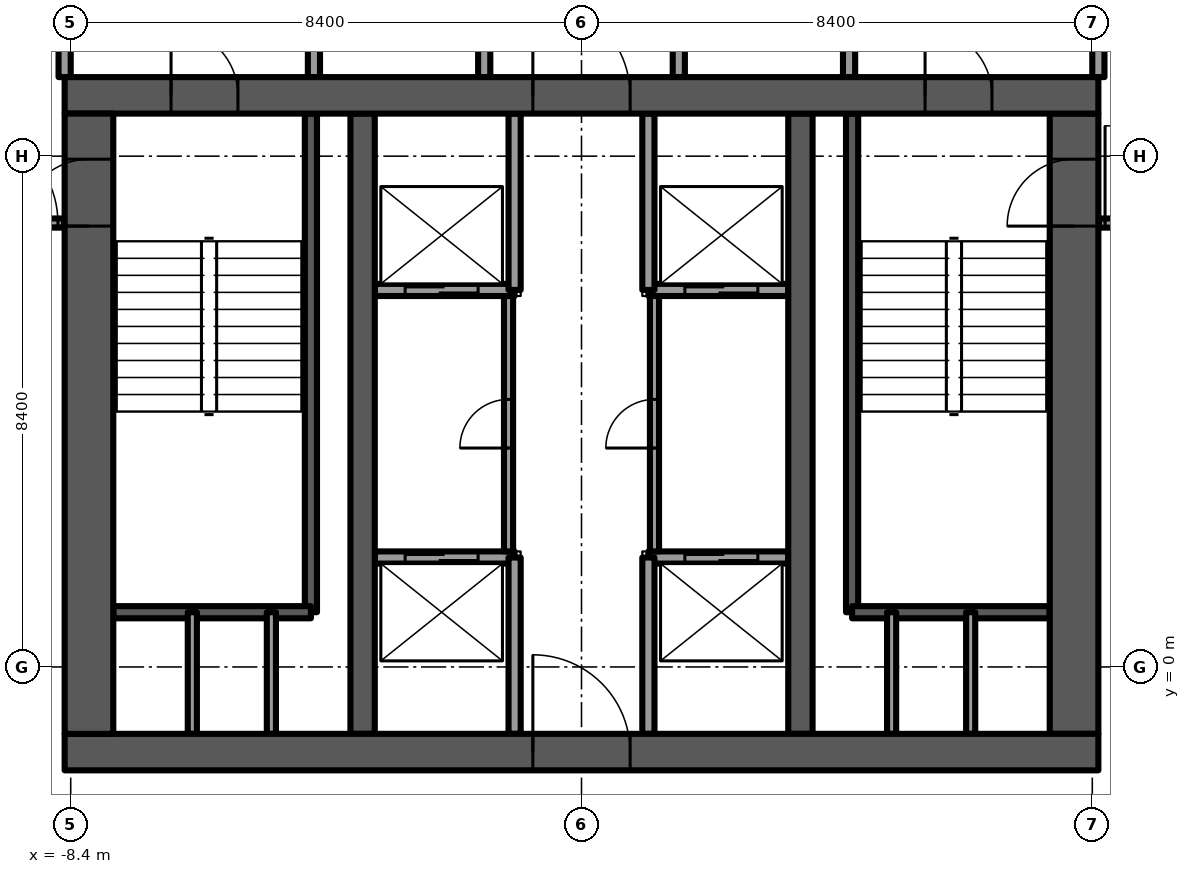
"""IFC4 building model, lengths in metres.
Left out: names, types, materials, properties, quantities, classifications, styles, units other than length and angle.
Written with IfcOpenShell. Run it as: python <this file> out.ifc"""

import sys

from ifc_helpers import new_model, si_unit, direction, frame, frame_2d, origin, place, context, subcontext, project, spatial, rectangle, extrude, element, fill, save


model = new_model("IFC4")
c1 = context("Model", 3, precision=1e-05, world=origin(), true_north=direction((0.0, 1.0)))
c2 = subcontext(c1, "Body", "Model", "MODEL_VIEW")
j1 = project(units=[si_unit("LENGTHUNIT", "METRE"), si_unit("PLANEANGLEUNIT", "RADIAN")], contexts=[c1])
p1 = place(None, origin())
s1 = spatial("IfcSite", under=j1, at=p1, CompositionType="ELEMENT")
p2 = place(p1, origin())
s2 = spatial("IfcBuilding", under=s1, at=p2, CompositionType="ELEMENT")
p3 = place(p2, frame((0.0, 0.0, 222.0)))
s3 = spatial("IfcBuildingStorey", under=s2, at=p3, CompositionType="ELEMENT", Elevation=222.0)
p4 = place(p3, frame((-8.5, -1.4, -0.3), z_axis=(0.0, 0.0, 1.0), x_axis=(1.0, 0.0, 0.0)))
e1 = element("IfcWall", 1, at=p4, inside=s3, PredefinedType="SHEAR", context=c2, shape_type="SweptSolid", body=[
    extrude(rectangle(XDim=17.0, YDim=0.6, at=frame_2d((8.5, 0.0))), origin(), (0.0, 0.0, 1.0), 3.75),
])
p5 = place(p4, frame((7.7, 0.0, 0.0)))
e2 = element("IfcOpeningElement", 2, at=p5, cuts=e1, PredefinedType="OPENING", context=c2, shape_type="SweptSolid", body=[
    extrude(rectangle(XDim=1.6, YDim=2.1, at=frame_2d((0.8, 1.05))), frame((0.0, 0.3, 0.0), z_axis=(0.0, -1.0, 0.0), x_axis=(1.0, 0.0, 0.0)), (0.0, 0.0, 1.0), 0.6),
])
p6 = place(p3, frame((-8.5, 9.4, -0.3), z_axis=(0.0, 0.0, 1.0), x_axis=(1.0, 0.0, 0.0)))
e3 = element("IfcWall", 3, at=p6, inside=s3, PredefinedType="SHEAR", context=c2, shape_type="SweptSolid", body=[
    extrude(rectangle(XDim=17.0, YDim=0.6, at=frame_2d((8.5, 0.0))), origin(), (0.0, 0.0, 1.0), 3.75),
])
p7 = place(p6, frame((7.7, 0.0, 0.0)))
e4 = element("IfcOpeningElement", 4, at=p7, cuts=e3, PredefinedType="OPENING", context=c2, shape_type="SweptSolid", body=[
    extrude(rectangle(XDim=1.6, YDim=2.1, at=frame_2d((0.8, 1.05))), frame((0.0, 0.3, 0.0), z_axis=(0.0, -1.0, 0.0), x_axis=(1.0, 0.0, 0.0)), (0.0, 0.0, 1.0), 0.6),
])
p8 = place(p6, frame((1.75, 0.0, 0.0)))
e5 = element("IfcOpeningElement", 5, at=p8, cuts=e3, PredefinedType="OPENING", context=c2, shape_type="SweptSolid", body=[
    extrude(rectangle(XDim=1.1, YDim=2.1, at=frame_2d((0.55, 1.05))), frame((0.0, 0.3, 0.0), z_axis=(0.0, -1.0, 0.0), x_axis=(1.0, 0.0, 0.0)), (0.0, 0.0, 1.0), 0.6),
])
p9 = place(p6, frame((14.15, 0.0, 0.0)))
e6 = element("IfcOpeningElement", 6, at=p9, cuts=e3, PredefinedType="OPENING", context=c2, shape_type="SweptSolid", body=[
    extrude(rectangle(XDim=1.1, YDim=2.1, at=frame_2d((0.55, 1.05))), frame((0.0, 0.3, 0.0), z_axis=(0.0, -1.0, 0.0), x_axis=(1.0, 0.0, 0.0)), (0.0, 0.0, 1.0), 0.6),
])
p10 = place(p3, frame((-8.1, -1.1, -0.3), z_axis=(0.0, 0.0, 1.0), x_axis=(0.0, 1.0, 0.0)))
e7 = element("IfcWall", 7, at=p10, inside=s3, PredefinedType="SHEAR", context=c2, shape_type="SweptSolid", body=[
    extrude(rectangle(XDim=10.2, YDim=0.8, at=frame_2d((5.1, 0.0))), origin(), (0.0, 0.0, 1.0), 3.75),
])
p11 = place(p10, frame((8.35, 0.0, 0.0)))
e8 = element("IfcOpeningElement", 8, at=p11, cuts=e7, PredefinedType="OPENING", context=c2, shape_type="SweptSolid", body=[
    extrude(rectangle(XDim=1.1, YDim=2.1, at=frame_2d((0.55, 1.05))), frame((0.0, 0.4, 0.0), z_axis=(0.0, -1.0, 0.0), x_axis=(1.0, 0.0, 0.0)), (0.0, 0.0, 1.0), 0.8),
])
p12 = place(p3, frame((8.1, -1.1, -0.3), z_axis=(0.0, 0.0, 1.0), x_axis=(0.0, 1.0, 0.0)))
e9 = element("IfcWall", 9, at=p12, inside=s3, PredefinedType="SHEAR", context=c2, shape_type="SweptSolid", body=[
    extrude(rectangle(XDim=10.2, YDim=0.8, at=frame_2d((5.1, 0.0))), origin(), (0.0, 0.0, 1.0), 3.75),
])
p13 = place(p12, frame((8.35, 0.0, 0.0)))
e10 = element("IfcOpeningElement", 10, at=p13, cuts=e9, PredefinedType="OPENING", context=c2, shape_type="SweptSolid", body=[
    extrude(rectangle(XDim=1.1, YDim=2.1, at=frame_2d((0.55, 1.05))), frame((0.0, 0.4, 0.0), z_axis=(0.0, -1.0, 0.0), x_axis=(1.0, 0.0, 0.0)), (0.0, 0.0, 1.0), 0.8),
])
for number, where, z_axis, x_axis in (
    (11, (-3.6, -1.1, -0.3), (0.0, 0.0, 1.0), (0.0, 1.0, 0.0)),
    (12, (3.6, -1.1, -0.3), (0.0, 0.0, 1.0), (0.0, 1.0, 0.0)),
):
    element("IfcWall", number, at=place(p3, frame(where, z_axis=z_axis, x_axis=x_axis)), inside=s3, PredefinedType="SHEAR", context=c2, shape_type="SweptSolid", body=[
        extrude(rectangle(XDim=10.2, YDim=0.4, at=frame_2d((5.1, 0.0))), origin(), (0.0, 0.0, 1.0), 3.75),
    ])
p14 = place(p3, frame((-3.4, 1.8, 0.0), z_axis=(0.0, 0.0, 1.0), x_axis=(1.0, 0.0, 0.0)))
e13 = element("IfcWall", 13, at=p14, inside=s3, PredefinedType="PARTITIONING", context=c2, shape_type="SweptSolid", body=[
    extrude(rectangle(XDim=2.3, YDim=0.2, at=frame_2d((1.15, 0.0))), origin(), (0.0, 0.0, 1.0), 3.45),
])
p15 = place(p14, frame((0.5, 0.0, 0.0)))
e14 = element("IfcOpeningElement", 14, at=p15, cuts=e13, PredefinedType="OPENING", context=c2, shape_type="SweptSolid", body=[
    extrude(rectangle(XDim=1.2, YDim=2.1, at=frame_2d((0.6, 1.05))), frame((0.0, 0.1, 0.0), z_axis=(0.0, -1.0, 0.0), x_axis=(1.0, 0.0, 0.0)), (0.0, 0.0, 1.0), 0.2),
])
p16 = place(p3, frame((-3.4, 6.2, 0.0), z_axis=(0.0, 0.0, 1.0), x_axis=(1.0, 0.0, 0.0)))
e15 = element("IfcWall", 15, at=p16, inside=s3, PredefinedType="PARTITIONING", context=c2, shape_type="SweptSolid", body=[
    extrude(rectangle(XDim=2.3, YDim=0.2, at=frame_2d((1.15, 0.0))), origin(), (0.0, 0.0, 1.0), 3.45),
])
p17 = place(p16, frame((0.5, 0.0, 0.0)))
e16 = element("IfcOpeningElement", 16, at=p17, cuts=e15, PredefinedType="OPENING", context=c2, shape_type="SweptSolid", body=[
    extrude(rectangle(XDim=1.2, YDim=2.1, at=frame_2d((0.6, 1.05))), frame((0.0, 0.1, 0.0), z_axis=(0.0, -1.0, 0.0), x_axis=(1.0, 0.0, 0.0)), (0.0, 0.0, 1.0), 0.2),
])
p18 = place(p3, frame((1.1, 1.8, 0.0), z_axis=(0.0, 0.0, 1.0), x_axis=(1.0, 0.0, 0.0)))
e17 = element("IfcWall", 17, at=p18, inside=s3, PredefinedType="PARTITIONING", context=c2, shape_type="SweptSolid", body=[
    extrude(rectangle(XDim=2.3, YDim=0.2, at=frame_2d((1.15, 0.0))), origin(), (0.0, 0.0, 1.0), 3.45),
])
p19 = place(p18, frame((0.6, 0.0, 0.0)))
e18 = element("IfcOpeningElement", 18, at=p19, cuts=e17, PredefinedType="OPENING", context=c2, shape_type="SweptSolid", body=[
    extrude(rectangle(XDim=1.2, YDim=2.1, at=frame_2d((0.6, 1.05))), frame((0.0, 0.1, 0.0), z_axis=(0.0, -1.0, 0.0), x_axis=(1.0, 0.0, 0.0)), (0.0, 0.0, 1.0), 0.2),
])
p20 = place(p3, frame((1.1, 6.2, 0.0), z_axis=(0.0, 0.0, 1.0), x_axis=(1.0, 0.0, 0.0)))
e19 = element("IfcWall", 19, at=p20, inside=s3, PredefinedType="PARTITIONING", context=c2, shape_type="SweptSolid", body=[
    extrude(rectangle(XDim=2.3, YDim=0.2, at=frame_2d((1.15, 0.0))), origin(), (0.0, 0.0, 1.0), 3.45),
])
p21 = place(p20, frame((0.6, 0.0, 0.0)))
e20 = element("IfcOpeningElement", 20, at=p21, cuts=e19, PredefinedType="OPENING", context=c2, shape_type="SweptSolid", body=[
    extrude(rectangle(XDim=1.2, YDim=2.1, at=frame_2d((0.6, 1.05))), frame((0.0, 0.1, 0.0), z_axis=(0.0, -1.0, 0.0), x_axis=(1.0, 0.0, 0.0)), (0.0, 0.0, 1.0), 0.2),
])
for number, where, z_axis, x_axis in (
    (21, (-1.1, -1.1, 0.0), (0.0, 0.0, 1.0), (0.0, 1.0, 0.0)),
    (22, (1.1, -1.1, 0.0), (0.0, 0.0, 1.0), (0.0, 1.0, 0.0)),
    (23, (-1.1, 6.2, 0.0), (0.0, 0.0, 1.0), (0.0, 1.0, 0.0)),
    (24, (1.1, 6.2, 0.0), (0.0, 0.0, 1.0), (0.0, 1.0, 0.0)),
):
    element("IfcWall", number, at=place(p3, frame(where, z_axis=z_axis, x_axis=x_axis)), inside=s3, PredefinedType="PARTITIONING", context=c2, shape_type="SweptSolid", body=[
        extrude(rectangle(XDim=2.9, YDim=0.2, at=frame_2d((1.45, 0.0))), origin(), (0.0, 0.0, 1.0), 3.45),
    ])
p22 = place(p3, frame((-4.45, 0.9, -0.3), z_axis=(0.0, 0.0, 1.0), x_axis=(0.0, 1.0, 0.0)))
e25 = element("IfcWall", 25, at=p22, inside=s3, PredefinedType="SOLIDWALL", context=c2, shape_type="SweptSolid", body=[
    extrude(rectangle(XDim=8.2, YDim=0.2, at=frame_2d((4.1, 0.0))), origin(), (0.0, 0.0, 1.0), 3.75),
])
p23 = place(p3, frame((-7.7, 0.9, -0.3), z_axis=(0.0, 0.0, 1.0), x_axis=(1.0, 0.0, 0.0)))
e26 = element("IfcWall", 26, at=p23, inside=s3, PredefinedType="SOLIDWALL", context=c2, shape_type="SweptSolid", body=[
    extrude(rectangle(XDim=3.25, YDim=0.2, at=frame_2d((1.625, 0.0))), origin(), (0.0, 0.0, 1.0), 3.75),
])
for number, where, z_axis, x_axis in (
    (27, (-6.4, -1.1, 0.0), (0.0, 0.0, 1.0), (0.0, 1.0, 0.0)),
    (28, (-5.1, -1.1, 0.0), (0.0, 0.0, 1.0), (0.0, 1.0, 0.0)),
):
    element("IfcWall", number, at=place(p3, frame(where, z_axis=z_axis, x_axis=x_axis)), inside=s3, PredefinedType="PARTITIONING", context=c2, shape_type="SweptSolid", body=[
        extrude(rectangle(XDim=2.0, YDim=0.15, at=frame_2d((1.0, 0.0))), origin(), (0.0, 0.0, 1.0), 3.45),
    ])
p24 = place(p3, frame((4.45, 0.9, -0.3), z_axis=(0.0, 0.0, 1.0), x_axis=(0.0, 1.0, 0.0)))
e29 = element("IfcWall", 29, at=p24, inside=s3, PredefinedType="SOLIDWALL", context=c2, shape_type="SweptSolid", body=[
    extrude(rectangle(XDim=8.2, YDim=0.2, at=frame_2d((4.1, 0.0))), origin(), (0.0, 0.0, 1.0), 3.75),
])
p25 = place(p3, frame((4.45, 0.9, -0.3), z_axis=(0.0, 0.0, 1.0), x_axis=(1.0, 0.0, 0.0)))
e30 = element("IfcWall", 30, at=p25, inside=s3, PredefinedType="SOLIDWALL", context=c2, shape_type="SweptSolid", body=[
    extrude(rectangle(XDim=3.25, YDim=0.2, at=frame_2d((1.625, 0.0))), origin(), (0.0, 0.0, 1.0), 3.75),
])
for number, where, z_axis, x_axis in (
    (31, (5.1, -1.1, 0.0), (0.0, 0.0, 1.0), (0.0, 1.0, 0.0)),
    (32, (6.4, -1.1, 0.0), (0.0, 0.0, 1.0), (0.0, 1.0, 0.0)),
):
    element("IfcWall", number, at=place(p3, frame(where, z_axis=z_axis, x_axis=x_axis)), inside=s3, PredefinedType="PARTITIONING", context=c2, shape_type="SweptSolid", body=[
        extrude(rectangle(XDim=2.0, YDim=0.15, at=frame_2d((1.0, 0.0))), origin(), (0.0, 0.0, 1.0), 3.45),
    ])
p26 = place(p3, frame((-8.5, 9.7, 0.0), z_axis=(0.0, 0.0, 1.0), x_axis=(0.0, 1.0, 0.0)))
e33 = element("IfcWall", 33, at=p26, inside=s3, PredefinedType="PARTITIONING", context=c2, shape_type="SweptSolid", body=[
    extrude(rectangle(XDim=3.9, YDim=0.2, at=frame_2d((1.95, 0.0))), origin(), (0.0, 0.0, 1.0), 3.45),
])
p27 = place(p26, frame((1.35, 0.0, 0.0)))
e34 = element("IfcOpeningElement", 34, at=p27, cuts=e33, PredefinedType="OPENING", context=c2, shape_type="SweptSolid", body=[
    extrude(rectangle(XDim=1.2, YDim=2.1, at=frame_2d((0.6, 1.05))), frame((0.0, 0.1, 0.0), z_axis=(0.0, -1.0, 0.0), x_axis=(1.0, 0.0, 0.0)), (0.0, 0.0, 1.0), 0.2),
])
p28 = place(p3, frame((8.5, 9.7, 0.0), z_axis=(0.0, 0.0, 1.0), x_axis=(0.0, 1.0, 0.0)))
e35 = element("IfcWall", 35, at=p28, inside=s3, PredefinedType="PARTITIONING", context=c2, shape_type="SweptSolid", body=[
    extrude(rectangle(XDim=3.9, YDim=0.2, at=frame_2d((1.95, 0.0))), origin(), (0.0, 0.0, 1.0), 3.45),
])
p29 = place(p28, frame((1.35, 0.0, 0.0)))
e36 = element("IfcOpeningElement", 36, at=p29, cuts=e35, PredefinedType="OPENING", context=c2, shape_type="SweptSolid", body=[
    extrude(rectangle(XDim=1.2, YDim=2.1, at=frame_2d((0.6, 1.05))), frame((0.0, 0.1, 0.0), z_axis=(0.0, -1.0, 0.0), x_axis=(1.0, 0.0, 0.0)), (0.0, 0.0, 1.0), 0.2),
])
p30 = place(p3, frame((-4.4, 9.7, 0.0), z_axis=(0.0, 0.0, 1.0), x_axis=(0.0, 1.0, 0.0)))
e37 = element("IfcWall", 37, at=p30, inside=s3, PredefinedType="PARTITIONING", context=c2, shape_type="SweptSolid", body=[
    extrude(rectangle(XDim=3.9, YDim=0.2, at=frame_2d((1.95, 0.0))), origin(), (0.0, 0.0, 1.0), 3.45),
])
p31 = place(p30, frame((1.35, 0.0, 0.0)))
e38 = element("IfcOpeningElement", 38, at=p31, cuts=e37, PredefinedType="OPENING", context=c2, shape_type="SweptSolid", body=[
    extrude(rectangle(XDim=1.2, YDim=2.1, at=frame_2d((0.6, 1.05))), frame((0.0, 0.1, 0.0), z_axis=(0.0, -1.0, 0.0), x_axis=(1.0, 0.0, 0.0)), (0.0, 0.0, 1.0), 0.2),
])
p32 = place(p3, frame((4.4, 9.7, 0.0), z_axis=(0.0, 0.0, 1.0), x_axis=(0.0, 1.0, 0.0)))
e39 = element("IfcWall", 39, at=p32, inside=s3, PredefinedType="PARTITIONING", context=c2, shape_type="SweptSolid", body=[
    extrude(rectangle(XDim=3.9, YDim=0.2, at=frame_2d((1.95, 0.0))), origin(), (0.0, 0.0, 1.0), 3.45),
])
p33 = place(p32, frame((1.35, 0.0, 0.0)))
e40 = element("IfcOpeningElement", 40, at=p33, cuts=e39, PredefinedType="OPENING", context=c2, shape_type="SweptSolid", body=[
    extrude(rectangle(XDim=1.2, YDim=2.1, at=frame_2d((0.6, 1.05))), frame((0.0, 0.1, 0.0), z_axis=(0.0, -1.0, 0.0), x_axis=(1.0, 0.0, 0.0)), (0.0, 0.0, 1.0), 0.2),
])
for number, where, z_axis, x_axis in (
    (41, (-1.6, 9.7, 0.0), (0.0, 0.0, 1.0), (0.0, 1.0, 0.0)),
    (42, (1.6, 9.7, 0.0), (0.0, 0.0, 1.0), (0.0, 1.0, 0.0)),
):
    element("IfcWall", number, at=place(p3, frame(where, z_axis=z_axis, x_axis=x_axis)), inside=s3, PredefinedType="PARTITIONING", context=c2, shape_type="SweptSolid", body=[
        extrude(rectangle(XDim=3.9, YDim=0.2, at=frame_2d((1.95, 0.0))), origin(), (0.0, 0.0, 1.0), 3.45),
    ])
p34 = place(p3, frame((-1.2, 1.9, 0.0), z_axis=(0.0, 0.0, 1.0), x_axis=(0.0, 1.0, 0.0)))
e43 = element("IfcWall", 43, at=p34, inside=s3, PredefinedType="PARTITIONING", context=c2, shape_type="SweptSolid", body=[
    extrude(rectangle(XDim=4.2, YDim=0.15, at=frame_2d((2.1, 0.0))), origin(), (0.0, 0.0, 1.0), 3.45),
])
p35 = place(p34, frame((1.7, 0.0, 0.0)))
e44 = element("IfcOpeningElement", 44, at=p35, cuts=e43, PredefinedType="OPENING", context=c2, shape_type="SweptSolid", body=[
    extrude(rectangle(XDim=0.8, YDim=2.1, at=frame_2d((0.4, 1.05))), frame((0.0, 0.075, 0.0), z_axis=(0.0, -1.0, 0.0), x_axis=(1.0, 0.0, 0.0)), (0.0, 0.0, 1.0), 0.15),
])
p36 = place(p3, frame((1.2, 1.9, 0.0), z_axis=(0.0, 0.0, 1.0), x_axis=(0.0, 1.0, 0.0)))
e45 = element("IfcWall", 45, at=p36, inside=s3, PredefinedType="PARTITIONING", context=c2, shape_type="SweptSolid", body=[
    extrude(rectangle(XDim=4.2, YDim=0.15, at=frame_2d((2.1, 0.0))), origin(), (0.0, 0.0, 1.0), 3.45),
])
p37 = place(p36, frame((1.7, 0.0, 0.0)))
e46 = element("IfcOpeningElement", 46, at=p37, cuts=e45, PredefinedType="OPENING", context=c2, shape_type="SweptSolid", body=[
    extrude(rectangle(XDim=0.8, YDim=2.1, at=frame_2d((0.4, 1.05))), frame((0.0, 0.075, 0.0), z_axis=(0.0, -1.0, 0.0), x_axis=(1.0, 0.0, 0.0)), (0.0, 0.0, 1.0), 0.15),
])
p38 = place(p3, frame((-10.585, 7.3, 0.0), z_axis=(0.0, 0.0, 1.0), x_axis=(1.0, 0.0, 0.0)))
e47 = element("IfcWall", 47, at=p38, inside=s3, PredefinedType="PARTITIONING", context=c2, shape_type="SweptSolid", body=[
    extrude(rectangle(XDim=2.075, YDim=0.15, at=frame_2d((1.038, 0.0))), origin(), (0.0, 0.0, 1.0), 3.45),
])
p39 = place(p38, frame((0.375, 0.0, 0.0)))
e48 = element("IfcOpeningElement", 48, at=p39, cuts=e47, PredefinedType="OPENING", context=c2, shape_type="SweptSolid", body=[
    extrude(rectangle(XDim=1.6, YDim=2.1, at=frame_2d((0.8, 1.05))), frame((0.0, 0.075, 0.0), z_axis=(0.0, -1.0, 0.0), x_axis=(1.0, 0.0, 0.0)), (0.0, 0.0, 1.0), 0.15),
])
p40 = place(p3, frame((8.51, 7.3, 0.0), z_axis=(0.0, 0.0, 1.0), x_axis=(1.0, 0.0, 0.0)))
e49 = element("IfcWall", 49, at=p40, inside=s3, PredefinedType="PARTITIONING", context=c2, shape_type="SweptSolid", body=[
    extrude(rectangle(XDim=2.075, YDim=0.15, at=frame_2d((1.038, 0.0))), origin(), (0.0, 0.0, 1.0), 3.45),
])
p41 = place(p40, frame((0.1, 0.0, 0.0)))
e50 = element("IfcOpeningElement", 50, at=p41, cuts=e49, PredefinedType="OPENING", context=c2, shape_type="SweptSolid", body=[
    extrude(rectangle(XDim=1.6, YDim=2.1, at=frame_2d((0.8, 1.05))), frame((0.0, 0.075, 0.0), z_axis=(0.0, -1.0, 0.0), x_axis=(1.0, 0.0, 0.0)), (0.0, 0.0, 1.0), 0.15),
])
p42 = place(p15, origin())
e51 = element("IfcDoor", 51, at=p42, inside=s3, OperationType="SLIDING_TO_LEFT", PredefinedType="DOOR", context=c2, shape_type="SweptSolid", body=[
    extrude(rectangle(XDim=1.2, YDim=2.1, at=frame_2d((0.6, 1.05))), frame((0.0, 0.025, 0.0), z_axis=(0.0, -1.0, 0.0), x_axis=(1.0, 0.0, 0.0)), (0.0, 0.0, 1.0), 0.05),
])
fill(e14, e51)
p43 = place(p19, origin())
e52 = element("IfcDoor", 52, at=p43, inside=s3, OperationType="SLIDING_TO_LEFT", PredefinedType="DOOR", context=c2, shape_type="SweptSolid", body=[
    extrude(rectangle(XDim=1.2, YDim=2.1, at=frame_2d((0.6, 1.05))), frame((0.0, 0.025, 0.0), z_axis=(0.0, -1.0, 0.0), x_axis=(1.0, 0.0, 0.0)), (0.0, 0.0, 1.0), 0.05),
])
fill(e18, e52)
p44 = place(p17, origin())
e53 = element("IfcDoor", 53, at=p44, inside=s3, OperationType="SLIDING_TO_LEFT", PredefinedType="DOOR", context=c2, shape_type="SweptSolid", body=[
    extrude(rectangle(XDim=1.2, YDim=2.1, at=frame_2d((0.6, 1.05))), frame((0.0, 0.025, 0.0), z_axis=(0.0, -1.0, 0.0), x_axis=(1.0, 0.0, 0.0)), (0.0, 0.0, 1.0), 0.05),
])
fill(e16, e53)
p45 = place(p21, origin())
e54 = element("IfcDoor", 54, at=p45, inside=s3, OperationType="SLIDING_TO_LEFT", PredefinedType="DOOR", context=c2, shape_type="SweptSolid", body=[
    extrude(rectangle(XDim=1.2, YDim=2.1, at=frame_2d((0.6, 1.05))), frame((0.0, 0.025, 0.0), z_axis=(0.0, -1.0, 0.0), x_axis=(1.0, 0.0, 0.0)), (0.0, 0.0, 1.0), 0.05),
])
fill(e20, e54)
p46 = place(p5, origin())
e55 = element("IfcDoor", 55, at=p46, inside=s3, OperationType="DOUBLE_DOOR_SINGLE_SWING", PredefinedType="DOOR", context=c2, shape_type="SweptSolid", body=[
    extrude(rectangle(XDim=1.6, YDim=2.1, at=frame_2d((0.8, 1.05))), frame((0.0, 0.025, 0.0), z_axis=(0.0, -1.0, 0.0), x_axis=(1.0, 0.0, 0.0)), (0.0, 0.0, 1.0), 0.05),
])
fill(e2, e55)
p47 = place(p7, origin())
e56 = element("IfcDoor", 56, at=p47, inside=s3, OperationType="DOUBLE_DOOR_SINGLE_SWING", PredefinedType="DOOR", context=c2, shape_type="SweptSolid", body=[
    extrude(rectangle(XDim=1.6, YDim=2.1, at=frame_2d((0.8, 1.05))), frame((0.0, 0.025, 0.0), z_axis=(0.0, -1.0, 0.0), x_axis=(1.0, 0.0, 0.0)), (0.0, 0.0, 1.0), 0.05),
])
fill(e4, e56)
p48 = place(p8, origin())
e57 = element("IfcDoor", 57, at=p48, inside=s3, OperationType="SINGLE_SWING_LEFT", PredefinedType="DOOR", context=c2, shape_type="SweptSolid", body=[
    extrude(rectangle(XDim=1.1, YDim=2.1, at=frame_2d((0.55, 1.05))), frame((0.0, 0.025, 0.0), z_axis=(0.0, -1.0, 0.0), x_axis=(1.0, 0.0, 0.0)), (0.0, 0.0, 1.0), 0.05),
])
fill(e5, e57)
p49 = place(p11, origin())
e58 = element("IfcDoor", 58, at=p49, inside=s3, OperationType="SINGLE_SWING_RIGHT", PredefinedType="DOOR", context=c2, shape_type="SweptSolid", body=[
    extrude(rectangle(XDim=1.1, YDim=2.1, at=frame_2d((0.55, 1.05))), frame((0.0, 0.025, 0.0), z_axis=(0.0, -1.0, 0.0), x_axis=(1.0, 0.0, 0.0)), (0.0, 0.0, 1.0), 0.05),
])
fill(e8, e58)
p50 = place(p9, origin())
e59 = element("IfcDoor", 59, at=p50, inside=s3, OperationType="SINGLE_SWING_RIGHT", PredefinedType="DOOR", context=c2, shape_type="SweptSolid", body=[
    extrude(rectangle(XDim=1.1, YDim=2.1, at=frame_2d((0.55, 1.05))), frame((0.0, 0.025, 0.0), z_axis=(0.0, -1.0, 0.0), x_axis=(1.0, 0.0, 0.0)), (0.0, 0.0, 1.0), 0.05),
])
fill(e6, e59)
p51 = place(p13, origin())
e60 = element("IfcDoor", 60, at=p51, inside=s3, OperationType="SINGLE_SWING_LEFT", PredefinedType="DOOR", context=c2, shape_type="SweptSolid", body=[
    extrude(rectangle(XDim=1.1, YDim=2.1, at=frame_2d((0.55, 1.05))), frame((0.0, 0.025, 0.0), z_axis=(0.0, -1.0, 0.0), x_axis=(1.0, 0.0, 0.0)), (0.0, 0.0, 1.0), 0.05),
])
fill(e10, e60)
p52 = place(p35, origin())
e61 = element("IfcDoor", 61, at=p52, inside=s3, OperationType="SINGLE_SWING_LEFT", PredefinedType="DOOR", context=c2, shape_type="SweptSolid", body=[
    extrude(rectangle(XDim=0.8, YDim=2.1, at=frame_2d((0.4, 1.05))), frame((0.0, 0.025, 0.0), z_axis=(0.0, -1.0, 0.0), x_axis=(1.0, 0.0, 0.0)), (0.0, 0.0, 1.0), 0.05),
])
fill(e44, e61)
p53 = place(p37, origin())
e62 = element("IfcDoor", 62, at=p53, inside=s3, OperationType="SINGLE_SWING_RIGHT", PredefinedType="DOOR", context=c2, shape_type="SweptSolid", body=[
    extrude(rectangle(XDim=0.8, YDim=2.1, at=frame_2d((0.4, 1.05))), frame((0.0, 0.025, 0.0), z_axis=(0.0, -1.0, 0.0), x_axis=(1.0, 0.0, 0.0)), (0.0, 0.0, 1.0), 0.05),
])
fill(e46, e62)
p54 = place(p39, origin())
e63 = element("IfcDoor", 63, at=p54, inside=s3, OperationType="DOUBLE_DOOR_SINGLE_SWING", PredefinedType="DOOR", context=c2, shape_type="SweptSolid", body=[
    extrude(rectangle(XDim=1.6, YDim=2.1, at=frame_2d((0.8, 1.05))), frame((0.0, 0.025, 0.0), z_axis=(0.0, -1.0, 0.0), x_axis=(1.0, 0.0, 0.0)), (0.0, 0.0, 1.0), 0.05),
])
fill(e48, e63)
p55 = place(p41, origin())
e64 = element("IfcDoor", 64, at=p55, inside=s3, OperationType="DOUBLE_DOOR_SINGLE_SWING", PredefinedType="DOOR", context=c2, shape_type="SweptSolid", body=[
    extrude(rectangle(XDim=1.6, YDim=2.1, at=frame_2d((0.8, 1.05))), frame((0.0, 0.025, 0.0), z_axis=(0.0, -1.0, 0.0), x_axis=(1.0, 0.0, 0.0)), (0.0, 0.0, 1.0), 0.05),
])
fill(e50, e64)
save(model, sys.argv[1])
